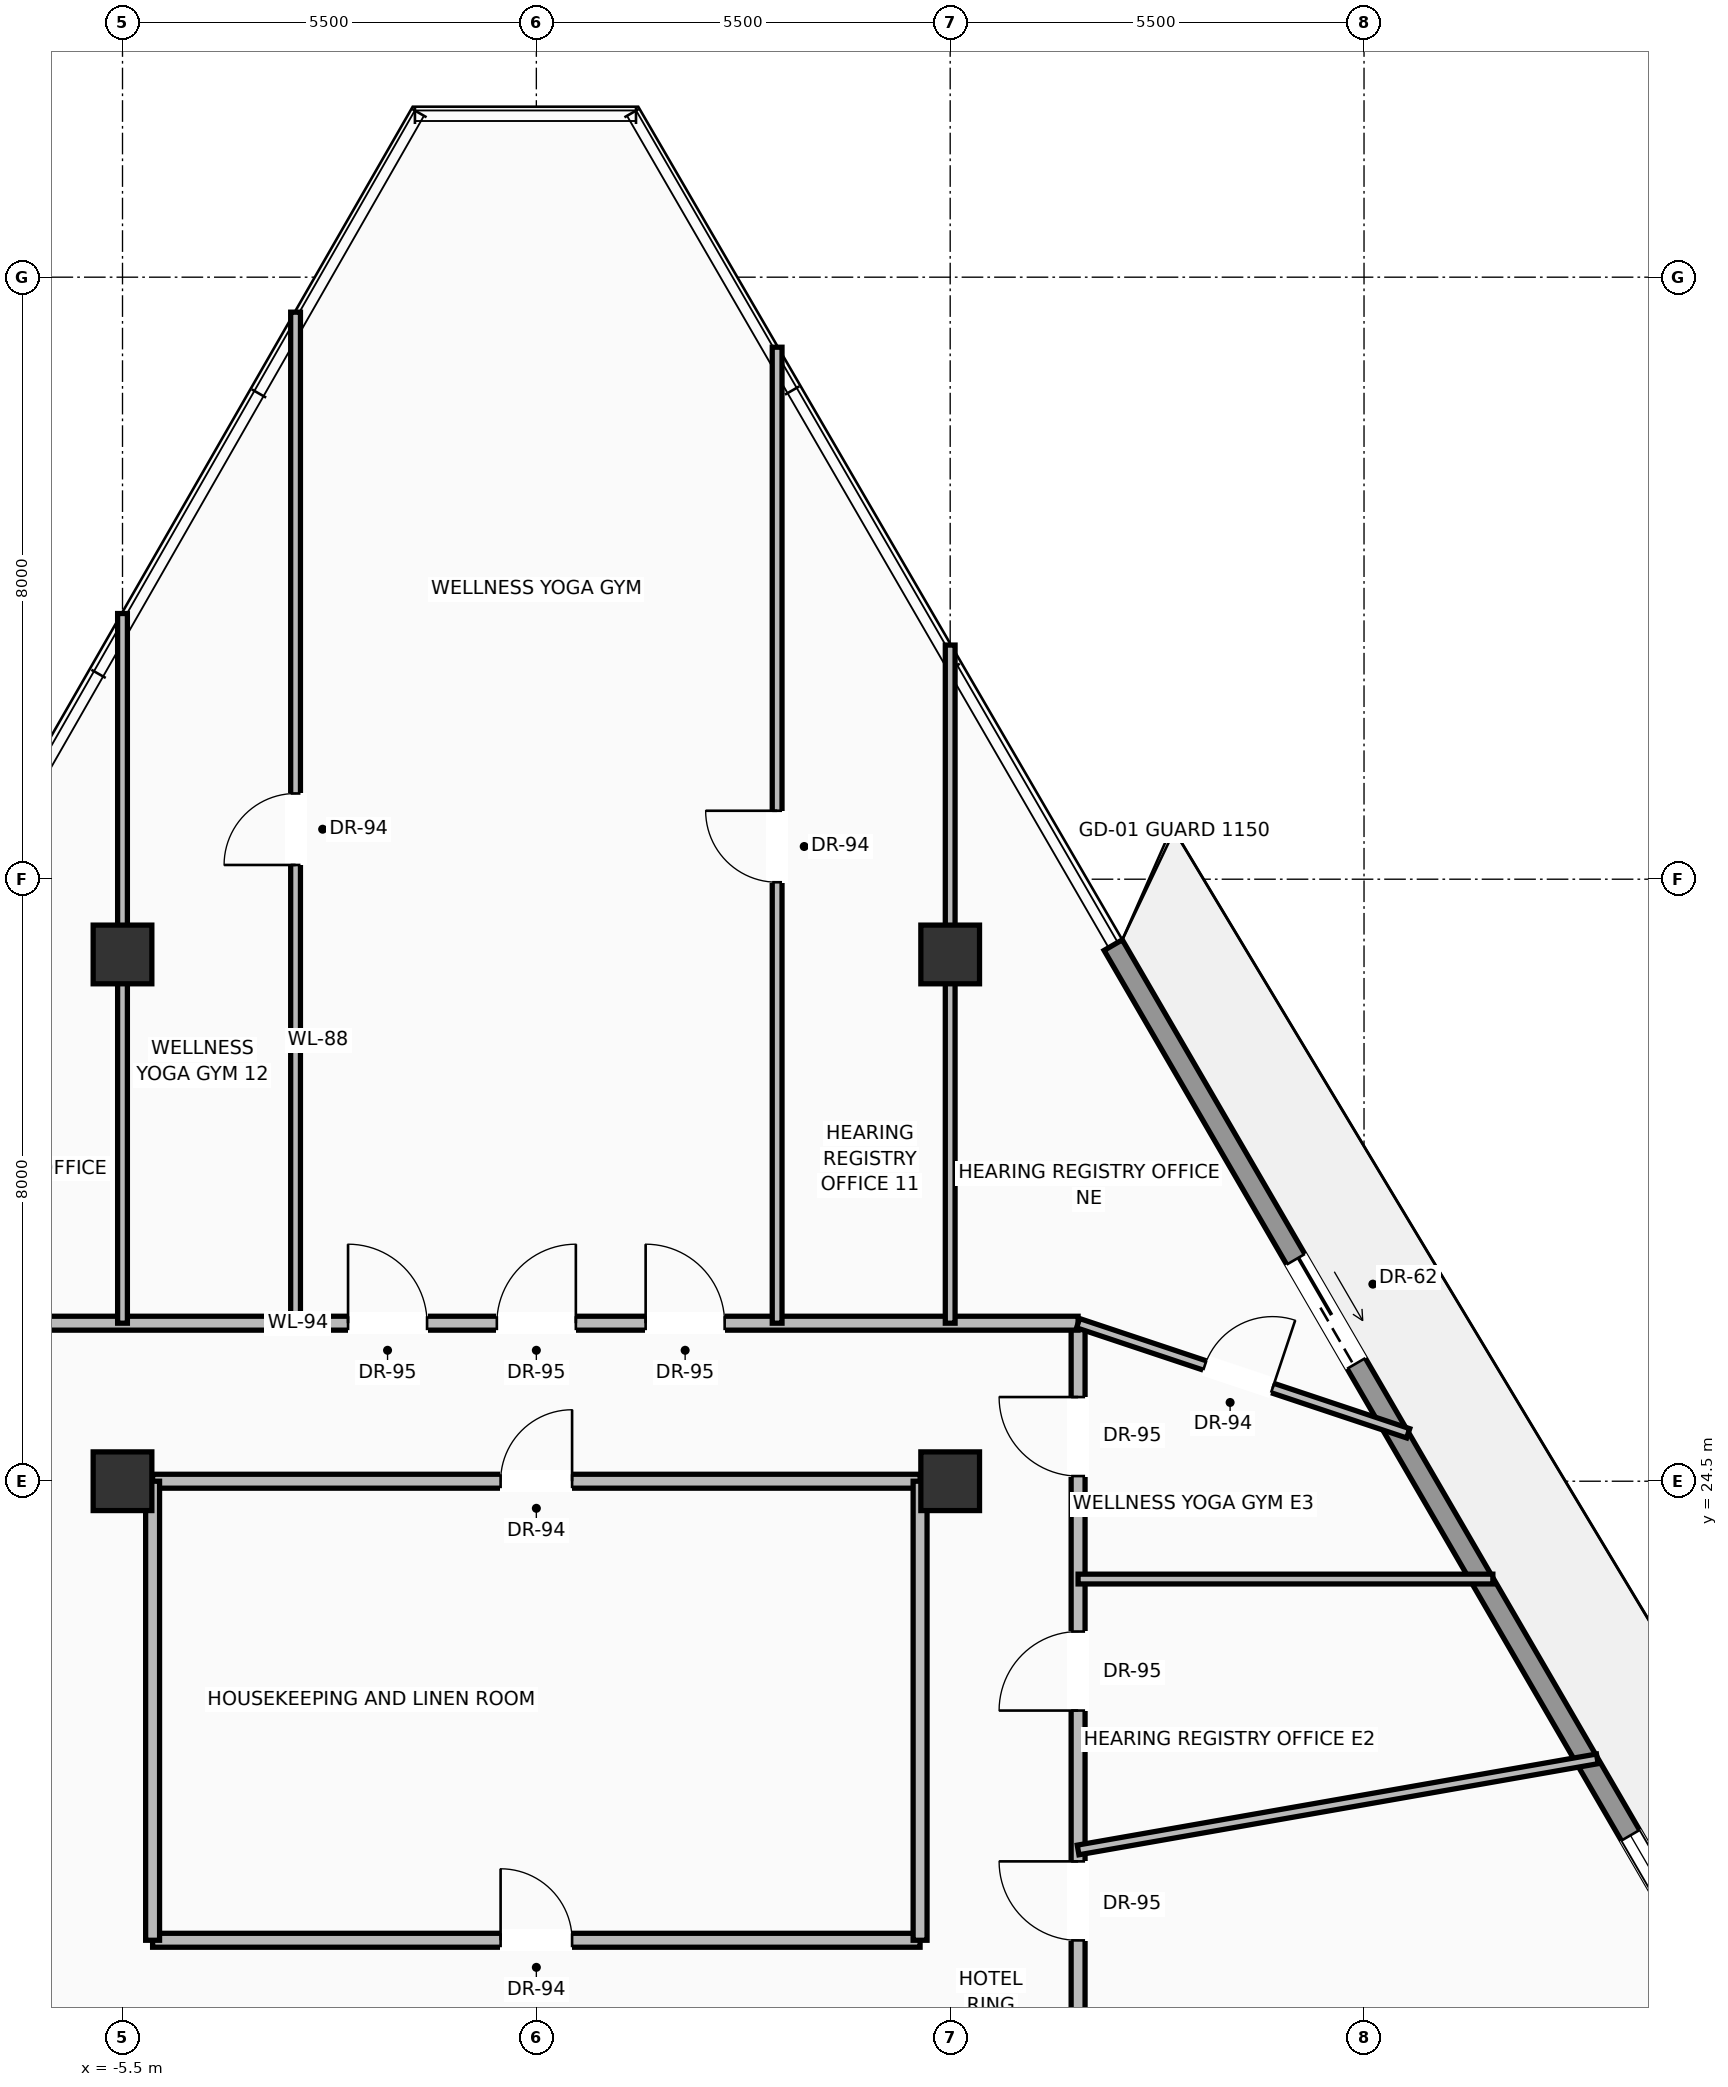
"""IFC4 building model, lengths in metres.
Left out: names, types, materials, properties, quantities, classifications, styles, units other than length and angle.
Written with IfcOpenShell. Run it as: python <this file> out.ifc"""

import sys

from ifc_helpers import new_model, si_unit, direction, frame, frame_2d, origin, origin_2d, place, context, subcontext, project, spatial, rectangle, extrude, source, transform, mapped, element, fill, save


model = new_model("IFC4")
c1 = context("Model", 3, precision=1e-05, world=origin(), true_north=direction((0.0, 1.0)))
c2 = subcontext(c1, "Body", "Model", "MODEL_VIEW")
j1 = project(units=[si_unit("LENGTHUNIT", "METRE"), si_unit("PLANEANGLEUNIT", "RADIAN")], contexts=[c1])
p1 = place(None, origin())
s1 = spatial("IfcSite", under=j1, at=p1, CompositionType="ELEMENT")
p2 = place(p1, origin())
s2 = spatial("IfcBuilding", under=s1, at=p2, CompositionType="ELEMENT")
p3 = place(p2, frame((0.0, 0.0, 290.25)))
s3 = spatial("IfcBuildingStorey", under=s2, at=p3, CompositionType="ELEMENT", Elevation=290.25)
m1 = source(origin(), c2, "Body", "SweptSolid", [
    extrude(rectangle(XDim=0.78, YDim=0.78, at=origin_2d()), origin(), (0.0, 0.0, 1.0), 3.45),
])
for number, where, z_axis, x_axis in (
    (1, (-5.5, 24.5, 0.0), (0.0, 0.0, 1.0), (1.0, 0.0, 0.0)),
    (2, (5.5, 24.5, 0.0), (0.0, 0.0, 1.0), (1.0, 0.0, 0.0)),
    (3, (-5.5, 31.5, 0.0), (0.0, 0.0, 1.0), (1.0, 0.0, 0.0)),
    (4, (5.5, 31.5, 0.0), (0.0, 0.0, 1.0), (1.0, 0.0, 0.0)),
):
    element("IfcColumn", number, at=place(p3, frame(where, z_axis=z_axis, x_axis=x_axis)), inside=s3, PredefinedType="COLUMN", context=c2, shape_type="MappedRepresentation", body=[
        mapped(m1, transform((0.0, 0.0, 0.0), scale=1.0)),
    ])
p4 = place(p3, frame((7.667, 31.624, 0.0), z_axis=(0.0, 0.0, 1.0), x_axis=(0.5024293772, -0.864618251558, 0.0)))
e5 = element("IfcWall", 5, at=p4, inside=s3, PredefinedType="SOLIDWALL", context=c2, shape_type="SweptSolid", body=[
    extrude(rectangle(XDim=20.121, YDim=0.28, at=frame_2d((10.061, 0.0))), origin(), (0.0, 0.0, 1.0), 2.82),
])
p5 = place(p4, frame((4.829, 0.0, 0.0)))
e6 = element("IfcOpeningElement", 6, at=p5, cuts=e5, PredefinedType="OPENING", context=c2, shape_type="SweptSolid", body=[
    extrude(rectangle(XDim=1.6, YDim=2.35, at=frame_2d((0.8, 1.175))), frame((0.0, 0.15, 0.0), z_axis=(0.0, -1.0, 0.0), x_axis=(1.0, 0.0, 0.0)), (0.0, 0.0, 1.0), 0.3),
])
p6 = place(p4, frame((13.682, 0.0, 0.9)))
e7 = element("IfcOpeningElement", 7, at=p6, cuts=e5, PredefinedType="OPENING", context=c2, shape_type="SweptSolid", body=[
    extrude(rectangle(XDim=2.0, YDim=1.75, at=frame_2d((1.0, 0.875))), frame((0.0, 0.15, 0.0), z_axis=(0.0, -1.0, 0.0), x_axis=(1.0, 0.0, 0.0)), (0.0, 0.0, 1.0), 0.3),
])
p7 = place(p3, frame((-5.1, 18.4, 0.0), z_axis=(0.0, 0.0, 1.0), x_axis=(1.0, 0.0, 0.0)))
e8 = element("IfcWall", 8, at=p7, inside=s3, PredefinedType="PARTITIONING", context=c2, shape_type="SweptSolid", body=[
    extrude(rectangle(XDim=10.2, YDim=0.185, at=frame_2d((5.1, 0.0))), origin(), (0.0, 0.0, 1.0), 3.232),
])
p8 = place(p7, frame((4.625, 0.0, 0.0)))
e9 = element("IfcOpeningElement", 9, at=p8, cuts=e8, PredefinedType="OPENING", context=c2, shape_type="SweptSolid", body=[
    extrude(rectangle(XDim=0.95, YDim=2.2, at=frame_2d((0.475, 1.1))), frame((0.0, 0.103, 0.0), z_axis=(0.0, -1.0, 0.0), x_axis=(1.0, 0.0, 0.0)), (0.0, 0.0, 1.0), 0.205),
])
p9 = place(p3, frame((-5.1, 24.5, 0.0), z_axis=(0.0, 0.0, 1.0), x_axis=(1.0, 0.0, 0.0)))
e10 = element("IfcWall", 10, at=p9, inside=s3, PredefinedType="PARTITIONING", context=c2, shape_type="SweptSolid", body=[
    extrude(rectangle(XDim=10.2, YDim=0.185, at=frame_2d((5.1, 0.0))), origin(), (0.0, 0.0, 1.0), 2.683),
])
p10 = place(p9, frame((4.625, 0.0, 0.0)))
e11 = element("IfcOpeningElement", 11, at=p10, cuts=e10, PredefinedType="OPENING", context=c2, shape_type="SweptSolid", body=[
    extrude(rectangle(XDim=0.95, YDim=2.2, at=frame_2d((0.475, 1.1))), frame((0.0, 0.103, 0.0), z_axis=(0.0, -1.0, 0.0), x_axis=(1.0, 0.0, 0.0)), (0.0, 0.0, 1.0), 0.205),
])
for number, where, z_axis, x_axis in (
    (12, (-5.1, 18.4, 0.0), (0.0, 0.0, 1.0), (0.0, 1.0, 0.0)),
    (13, (5.1, 18.4, 0.0), (0.0, 0.0, 1.0), (0.0, 1.0, 0.0)),
):
    element("IfcWall", number, at=place(p3, frame(where, z_axis=z_axis, x_axis=x_axis)), inside=s3, PredefinedType="PARTITIONING", context=c2, shape_type="SweptSolid", body=[
        extrude(rectangle(XDim=6.1, YDim=0.185, at=frame_2d((3.05, 0.0))), origin(), (0.0, 0.0, 1.0), 3.232),
    ])
p11 = place(p3, frame((7.2, 16.2, 0.0), z_axis=(0.0, 0.0, 1.0), x_axis=(0.0, 1.0, 0.0)))
e14 = element("IfcWall", 14, at=p11, inside=s3, PredefinedType="PARTITIONING", context=c2, shape_type="SweptSolid", body=[
    extrude(rectangle(XDim=10.4, YDim=0.185, at=frame_2d((5.2, 0.0))), origin(), (0.0, 0.0, 1.0), 3.232),
])
p12 = place(p11, frame((2.198, 0.0, 0.0)))
e15 = element("IfcOpeningElement", 15, at=p12, cuts=e14, PredefinedType="OPENING", context=c2, shape_type="SweptSolid", body=[
    extrude(rectangle(XDim=1.05, YDim=2.25, at=frame_2d((0.525, 1.125))), frame((0.0, 0.103, 0.0), z_axis=(0.0, -1.0, 0.0), x_axis=(1.0, 0.0, 0.0)), (0.0, 0.0, 1.0), 0.205),
])
p13 = place(p11, frame((5.252, 0.0, 0.0)))
e16 = element("IfcOpeningElement", 16, at=p13, cuts=e14, PredefinedType="OPENING", context=c2, shape_type="SweptSolid", body=[
    extrude(rectangle(XDim=1.05, YDim=2.25, at=frame_2d((0.525, 1.125))), frame((0.0, 0.103, 0.0), z_axis=(0.0, -1.0, 0.0), x_axis=(1.0, 0.0, 0.0)), (0.0, 0.0, 1.0), 0.205),
])
p14 = place(p11, frame((8.369, 0.0, 0.0)))
e17 = element("IfcOpeningElement", 17, at=p14, cuts=e14, PredefinedType="OPENING", context=c2, shape_type="SweptSolid", body=[
    extrude(rectangle(XDim=1.05, YDim=2.25, at=frame_2d((0.525, 1.125))), frame((0.0, 0.103, 0.0), z_axis=(0.0, -1.0, 0.0), x_axis=(1.0, 0.0, 0.0)), (0.0, 0.0, 1.0), 0.205),
])
p15 = place(p3, frame((-7.2, 26.6, 0.0), z_axis=(0.0, 0.0, 1.0), x_axis=(1.0, 0.0, 0.0)))
e18 = element("IfcWall", 18, at=p15, inside=s3, PredefinedType="PARTITIONING", context=c2, shape_type="SweptSolid", body=[
    extrude(rectangle(XDim=14.4, YDim=0.185, at=frame_2d((7.2, 0.0))), origin(), (0.0, 0.0, 1.0), 3.232),
])
p16 = place(p15, frame((4.698, 0.0, 0.0)))
e19 = element("IfcOpeningElement", 19, at=p16, cuts=e18, PredefinedType="OPENING", context=c2, shape_type="SweptSolid", body=[
    extrude(rectangle(XDim=1.05, YDim=2.25, at=frame_2d((0.525, 1.125))), frame((0.0, 0.103, 0.0), z_axis=(0.0, -1.0, 0.0), x_axis=(1.0, 0.0, 0.0)), (0.0, 0.0, 1.0), 0.205),
])
p17 = place(p15, frame((6.675, 0.0, 0.0)))
e20 = element("IfcOpeningElement", 20, at=p17, cuts=e18, PredefinedType="OPENING", context=c2, shape_type="SweptSolid", body=[
    extrude(rectangle(XDim=1.05, YDim=2.25, at=frame_2d((0.525, 1.125))), frame((0.0, 0.103, 0.0), z_axis=(0.0, -1.0, 0.0), x_axis=(1.0, 0.0, 0.0)), (0.0, 0.0, 1.0), 0.205),
])
p18 = place(p15, frame((8.653, 0.0, 0.0)))
e21 = element("IfcOpeningElement", 21, at=p18, cuts=e18, PredefinedType="OPENING", context=c2, shape_type="SweptSolid", body=[
    extrude(rectangle(XDim=1.05, YDim=2.25, at=frame_2d((0.525, 1.125))), frame((0.0, 0.103, 0.0), z_axis=(0.0, -1.0, 0.0), x_axis=(1.0, 0.0, 0.0)), (0.0, 0.0, 1.0), 0.205),
])
p19 = place(p3, frame((7.2, 26.6, 0.0), z_axis=(0.0, 0.0, 1.0), x_axis=(0.948614646457, -0.316433646328, 0.0)))
e22 = element("IfcWall", 22, at=p19, inside=s3, PredefinedType="PARTITIONING", context=c2, shape_type="SweptSolid", body=[
    extrude(rectangle(XDim=4.625, YDim=0.13, at=frame_2d((2.312, 0.0))), origin(), (0.0, 0.0, 1.0), 3.232),
])
p20 = place(p19, frame((1.775, 0.0, 0.0)))
e23 = element("IfcOpeningElement", 23, at=p20, cuts=e22, PredefinedType="OPENING", context=c2, shape_type="SweptSolid", body=[
    extrude(rectangle(XDim=0.95, YDim=2.2, at=frame_2d((0.475, 1.1))), frame((0.0, 0.075, 0.0), z_axis=(0.0, -1.0, 0.0), x_axis=(1.0, 0.0, 0.0)), (0.0, 0.0, 1.0), 0.15),
])
p21 = place(p3, frame((-5.5, 26.6, 0.0), z_axis=(0.0, 0.0, 1.0), x_axis=(0.0, 1.0, 0.0)))
e24 = element("IfcWall", 24, at=p21, inside=s3, PredefinedType="PARTITIONING", context=c2, shape_type="SweptSolid", body=[
    extrude(rectangle(XDim=9.43, YDim=0.13, at=frame_2d((4.715, 0.0))), origin(), (0.0, 0.0, 1.0), 2.683),
])
p22 = place(p3, frame((5.5, 26.6, 0.0), z_axis=(0.0, 0.0, 1.0), x_axis=(0.0, 1.0, 0.0)))
e25 = element("IfcWall", 25, at=p22, inside=s3, PredefinedType="PARTITIONING", context=c2, shape_type="SweptSolid", body=[
    extrude(rectangle(XDim=9.011, YDim=0.13, at=frame_2d((4.506, 0.0))), origin(), (0.0, 0.0, 1.0), 2.683),
])
p23 = place(p3, frame((-3.2, 26.6, 0.0), z_axis=(0.0, 0.0, 1.0), x_axis=(0.0, 1.0, 0.0)))
e26 = element("IfcWall", 26, at=p23, inside=s3, PredefinedType="PARTITIONING", context=c2, shape_type="SweptSolid", body=[
    extrude(rectangle(XDim=13.435, YDim=0.13, at=frame_2d((6.718, 0.0))), origin(), (0.0, 0.0, 1.0), 3.232),
])
p24 = place(p23, frame((6.089, 0.0, 0.0)))
e27 = element("IfcOpeningElement", 27, at=p24, cuts=e26, PredefinedType="OPENING", context=c2, shape_type="SweptSolid", body=[
    extrude(rectangle(XDim=0.95, YDim=2.2, at=frame_2d((0.475, 1.1))), frame((0.0, 0.075, 0.0), z_axis=(0.0, -1.0, 0.0), x_axis=(1.0, 0.0, 0.0)), (0.0, 0.0, 1.0), 0.15),
])
p25 = place(p3, frame((3.2, 26.6, 0.0), z_axis=(0.0, 0.0, 1.0), x_axis=(0.0, 1.0, 0.0)))
e28 = element("IfcWall", 28, at=p25, inside=s3, PredefinedType="PARTITIONING", context=c2, shape_type="SweptSolid", body=[
    extrude(rectangle(XDim=12.969, YDim=0.13, at=frame_2d((6.485, 0.0))), origin(), (0.0, 0.0, 1.0), 3.232),
])
p26 = place(p25, frame((5.86, 0.0, 0.0)))
e29 = element("IfcOpeningElement", 29, at=p26, cuts=e28, PredefinedType="OPENING", context=c2, shape_type="SweptSolid", body=[
    extrude(rectangle(XDim=0.95, YDim=2.2, at=frame_2d((0.475, 1.1))), frame((0.0, 0.075, 0.0), z_axis=(0.0, -1.0, 0.0), x_axis=(1.0, 0.0, 0.0)), (0.0, 0.0, 1.0), 0.15),
])
p27 = place(p3, frame((7.2, 19.6, 0.0), z_axis=(0.0, 0.0, 1.0), x_axis=(0.984955671934, 0.172807188294, 0.0)))
e30 = element("IfcWall", 30, at=p27, inside=s3, PredefinedType="PARTITIONING", context=c2, shape_type="SweptSolid", body=[
    extrude(rectangle(XDim=7.006, YDim=0.13, at=frame_2d((3.503, 0.0))), origin(), (0.0, 0.0, 1.0), 2.885),
])
p28 = place(p3, frame((7.2, 23.2, 0.0), z_axis=(0.0, 0.0, 1.0), x_axis=(1.0, 0.0, 0.0)))
e31 = element("IfcWall", 31, at=p28, inside=s3, PredefinedType="PARTITIONING", context=c2, shape_type="SweptSolid", body=[
    extrude(rectangle(XDim=5.512, YDim=0.13, at=frame_2d((2.756, 0.0))), origin(), (0.0, 0.0, 1.0), 3.232),
])
m2 = source(origin(), c2, "Body", "SweptSolid", [
    extrude(rectangle(XDim=1.6, YDim=2.35, at=frame_2d((0.8, 1.175))), frame((0.0, 0.025, 0.0), z_axis=(0.0, -1.0, 0.0), x_axis=(1.0, 0.0, 0.0)), (0.0, 0.0, 1.0), 0.05),
])
p29 = place(p5, origin())
e32 = element("IfcDoor", 32, at=p29, inside=s3, OperationType="SLIDING_TO_RIGHT", PredefinedType="DOOR", context=c2, shape_type="MappedRepresentation", body=[
    mapped(m2, transform((0.0, 0.0, 0.0), scale=1.0)),
])
fill(e6, e32)
m3 = source(origin(), c2, "Body", "SweptSolid", [
    extrude(rectangle(XDim=2.0, YDim=1.75, at=frame_2d((1.0, 0.875))), frame((0.0, 0.03, 0.0), z_axis=(0.0, -1.0, 0.0), x_axis=(1.0, 0.0, 0.0)), (0.0, 0.0, 1.0), 0.06),
])
p30 = place(p6, origin())
e33 = element("IfcWindow", 33, at=p30, inside=s3, PartitioningType="SINGLE_PANEL", PredefinedType="WINDOW", context=c2, shape_type="MappedRepresentation", body=[
    mapped(m3, transform((0.0, 0.0, 0.0), scale=1.0)),
])
fill(e7, e33)
m4 = source(origin(), c2, "Body", "SweptSolid", [
    extrude(rectangle(XDim=0.95, YDim=2.2, at=frame_2d((0.475, 1.1))), frame((0.0, 0.025, 0.0), z_axis=(0.0, -1.0, 0.0), x_axis=(1.0, 0.0, 0.0)), (0.0, 0.0, 1.0), 0.05),
])
p31 = place(p8, origin())
e34 = element("IfcDoor", 34, at=p31, inside=s3, OperationType="SINGLE_SWING_LEFT", PredefinedType="DOOR", context=c2, shape_type="MappedRepresentation", body=[
    mapped(m4, transform((0.0, 0.0, 0.0), scale=1.0)),
])
fill(e9, e34)
p32 = place(p10, origin())
e35 = element("IfcDoor", 35, at=p32, inside=s3, OperationType="SINGLE_SWING_RIGHT", PredefinedType="DOOR", context=c2, shape_type="MappedRepresentation", body=[
    mapped(m4, transform((0.0, 0.0, 0.0), scale=1.0)),
])
fill(e11, e35)
m5 = source(origin(), c2, "Body", "SweptSolid", [
    extrude(rectangle(XDim=1.05, YDim=2.25, at=frame_2d((0.525, 1.125))), frame((0.0, 0.025, 0.0), z_axis=(0.0, -1.0, 0.0), x_axis=(1.0, 0.0, 0.0)), (0.0, 0.0, 1.0), 0.05),
])
p33 = place(p12, origin())
e36 = element("IfcDoor", 36, at=p33, inside=s3, OperationType="SINGLE_SWING_RIGHT", PredefinedType="DOOR", context=c2, shape_type="MappedRepresentation", body=[
    mapped(m5, transform((0.0, 0.0, 0.0), scale=1.0)),
])
fill(e15, e36)
p34 = place(p13, origin())
e37 = element("IfcDoor", 37, at=p34, inside=s3, OperationType="SINGLE_SWING_LEFT", PredefinedType="DOOR", context=c2, shape_type="MappedRepresentation", body=[
    mapped(m5, transform((0.0, 0.0, 0.0), scale=1.0)),
])
fill(e16, e37)
p35 = place(p14, origin())
e38 = element("IfcDoor", 38, at=p35, inside=s3, OperationType="SINGLE_SWING_RIGHT", PredefinedType="DOOR", context=c2, shape_type="MappedRepresentation", body=[
    mapped(m5, transform((0.0, 0.0, 0.0), scale=1.0)),
])
fill(e17, e38)
p36 = place(p16, origin())
e39 = element("IfcDoor", 39, at=p36, inside=s3, OperationType="SINGLE_SWING_LEFT", PredefinedType="DOOR", context=c2, shape_type="MappedRepresentation", body=[
    mapped(m5, transform((0.0, 0.0, 0.0), scale=1.0)),
])
fill(e19, e39)
p37 = place(p17, origin())
e40 = element("IfcDoor", 40, at=p37, inside=s3, OperationType="SINGLE_SWING_RIGHT", PredefinedType="DOOR", context=c2, shape_type="MappedRepresentation", body=[
    mapped(m5, transform((0.0, 0.0, 0.0), scale=1.0)),
])
fill(e20, e40)
p38 = place(p18, origin())
e41 = element("IfcDoor", 41, at=p38, inside=s3, OperationType="SINGLE_SWING_LEFT", PredefinedType="DOOR", context=c2, shape_type="MappedRepresentation", body=[
    mapped(m5, transform((0.0, 0.0, 0.0), scale=1.0)),
])
fill(e21, e41)
p39 = place(p20, origin())
e42 = element("IfcDoor", 42, at=p39, inside=s3, OperationType="SINGLE_SWING_RIGHT", PredefinedType="DOOR", context=c2, shape_type="MappedRepresentation", body=[
    mapped(m4, transform((0.0, 0.0, 0.0), scale=1.0)),
])
fill(e23, e42)
p40 = place(p26, origin())
e43 = element("IfcDoor", 43, at=p40, inside=s3, OperationType="SINGLE_SWING_RIGHT", PredefinedType="DOOR", context=c2, shape_type="MappedRepresentation", body=[
    mapped(m4, transform((0.0, 0.0, 0.0), scale=1.0)),
])
fill(e29, e43)
p41 = place(p24, origin())
e44 = element("IfcDoor", 44, at=p41, inside=s3, OperationType="SINGLE_SWING_LEFT", PredefinedType="DOOR", context=c2, shape_type="MappedRepresentation", body=[
    mapped(m4, transform((0.0, 0.0, 0.0), scale=1.0)),
])
fill(e27, e44)
save(model, sys.argv[1])
